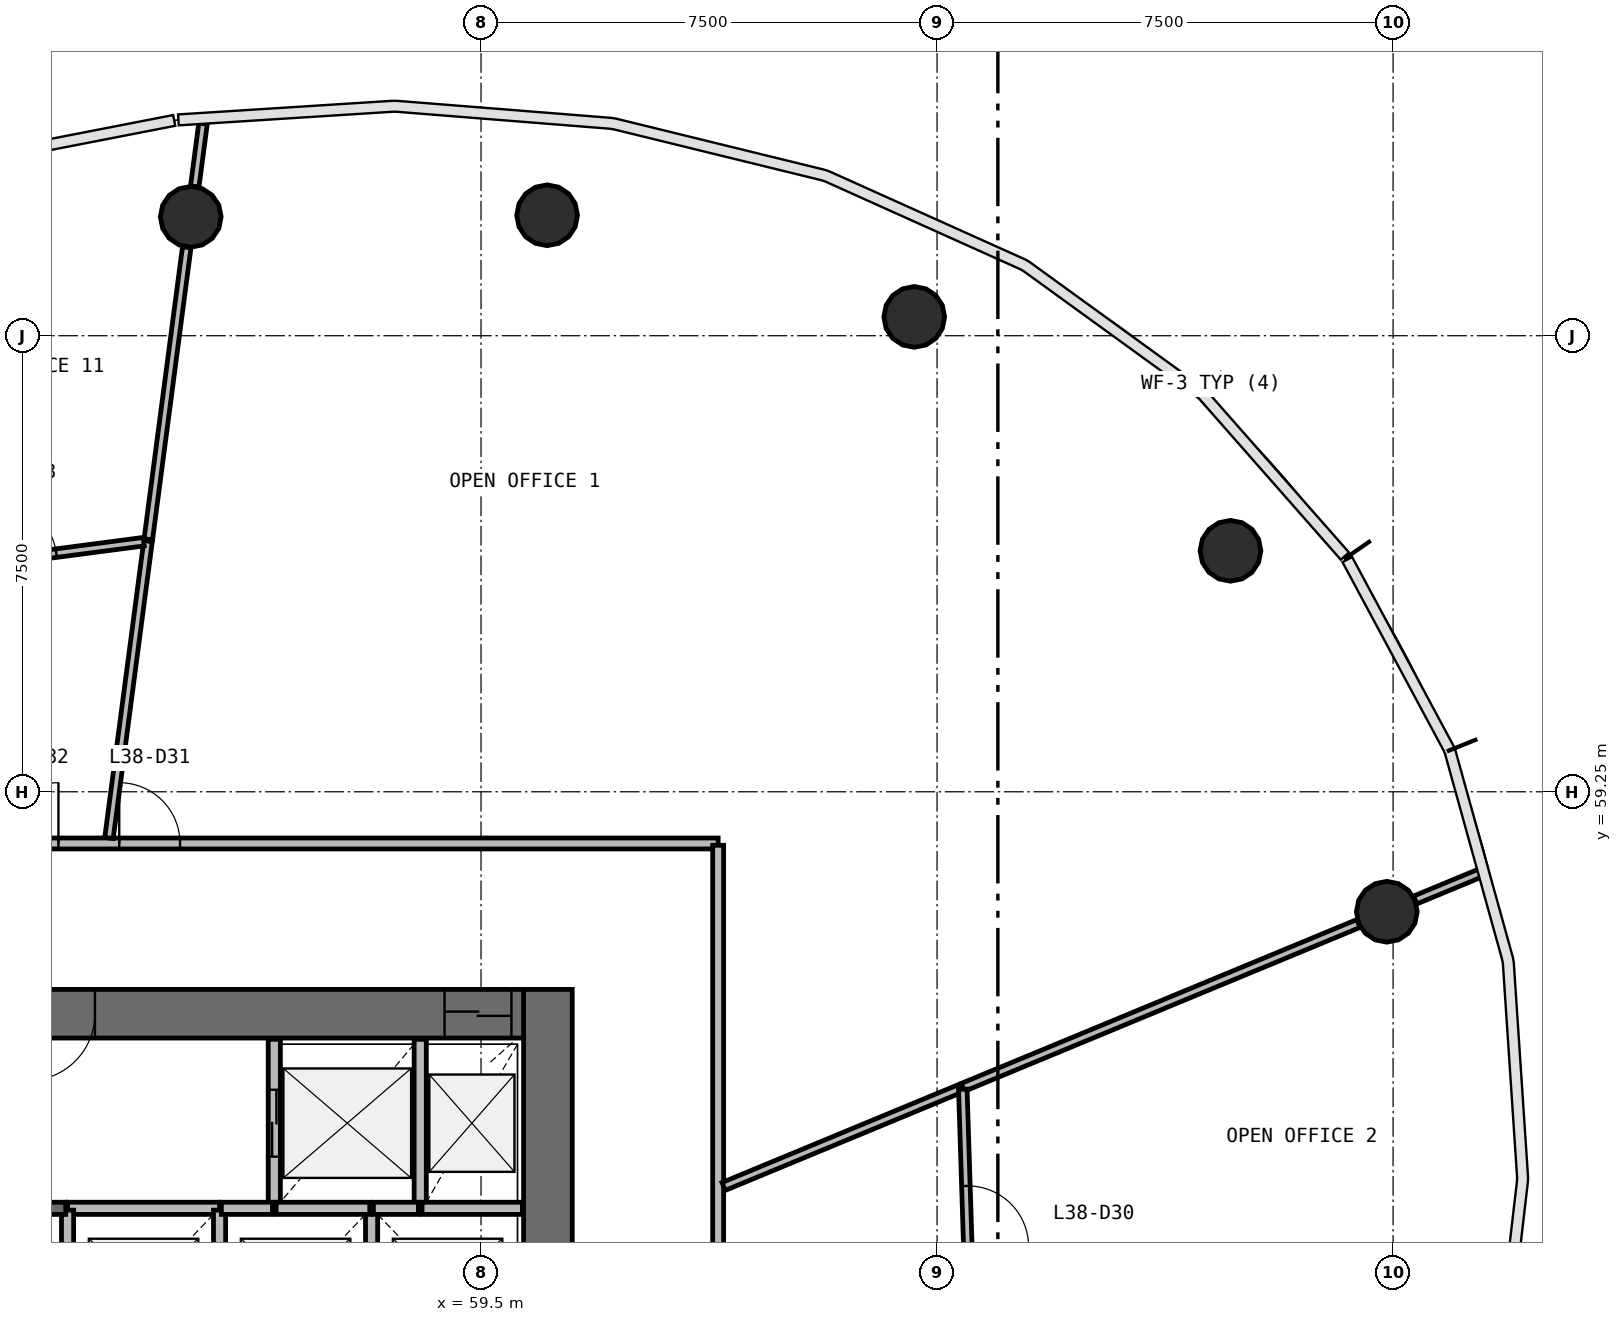
"""IFC4 building model, lengths in metres.
Left out: names, types, materials, properties, quantities, classifications, styles, units other than length and angle.
Written with IfcOpenShell. Run it as: python <this file> out.ifc"""

import sys

from ifc_helpers import new_model, si_unit, direction, frame, frame_2d, origin, origin_2d, place, context, subcontext, project, spatial, rectangle, circle, extrude, source, transform, mapped, element, fill, save


model = new_model("IFC4")
c1 = context("Model", 3, precision=1e-05, world=origin(), true_north=direction((0.0, 1.0)))
c2 = subcontext(c1, "Body", "Model", "MODEL_VIEW")
j1 = project(units=[si_unit("LENGTHUNIT", "METRE"), si_unit("PLANEANGLEUNIT", "RADIAN")], contexts=[c1])
p1 = place(None, origin())
s1 = spatial("IfcSite", under=j1, at=p1, CompositionType="ELEMENT")
p2 = place(p1, origin())
s2 = spatial("IfcBuilding", under=s1, at=p2, CompositionType="ELEMENT")
p3 = place(p2, frame((0.0, 0.0, 160.4)))
s3 = spatial("IfcBuildingStorey", under=s2, at=p3, CompositionType="ELEMENT", Elevation=160.4)
p4 = place(p3, frame((60.6, 40.0, 0.0), z_axis=(0.0, 0.0, 1.0), x_axis=(0.0, 1.0, 0.0)))
e1 = element("IfcWall", 1, at=p4, inside=s3, PredefinedType="SHEAR", context=c2, shape_type="SweptSolid", body=[
    extrude(rectangle(XDim=16.0, YDim=0.8, at=frame_2d((8.0, 0.0))), origin(), (0.0, 0.0, 1.0), 3.9),
])
p5 = place(p4, frame((7.1, 0.0, 0.0)))
e2 = element("IfcOpeningElement", 2, at=p5, cuts=e1, PredefinedType="OPENING", context=c2, shape_type="SweptSolid", body=[
    extrude(rectangle(XDim=1.8, YDim=2.1, at=frame_2d((0.9, 1.05))), frame((0.0, 0.41, 0.0), z_axis=(0.0, -1.0, 0.0), x_axis=(1.0, 0.0, 0.0)), (0.0, 0.0, 1.0), 0.82),
])
p6 = place(p3, frame((60.2, 55.6, 0.0), z_axis=(0.0, 0.0, 1.0), x_axis=(-1.0, 0.0, 0.0)))
e3 = element("IfcWall", 3, at=p6, inside=s3, PredefinedType="SHEAR", context=c2, shape_type="SweptSolid", body=[
    extrude(rectangle(XDim=16.4, YDim=0.8, at=frame_2d((8.2, 0.0))), origin(), (0.0, 0.0, 1.0), 3.9),
])
p7 = place(p6, frame((0.2, 0.0, 0.0)))
e4 = element("IfcOpeningElement", 4, at=p7, cuts=e3, PredefinedType="OPENING", context=c2, shape_type="SweptSolid", body=[
    extrude(rectangle(XDim=1.1, YDim=2.1, at=frame_2d((0.55, 1.05))), frame((0.0, 0.41, 0.0), z_axis=(0.0, -1.0, 0.0), x_axis=(1.0, 0.0, 0.0)), (0.0, 0.0, 1.0), 0.82),
])
p8 = place(p6, frame((10.1, 0.0, 0.0)))
e5 = element("IfcOpeningElement", 5, at=p8, cuts=e3, PredefinedType="OPENING", context=c2, shape_type="SweptSolid", body=[
    extrude(rectangle(XDim=1.2, YDim=2.1, at=frame_2d((0.6, 1.05))), frame((0.0, 0.41, 0.0), z_axis=(0.0, -1.0, 0.0), x_axis=(1.0, 0.0, 0.0)), (0.0, 0.0, 1.0), 0.82),
])
p9 = place(p6, frame((7.05, 0.0, 0.0)))
e6 = element("IfcOpeningElement", 6, at=p9, cuts=e3, PredefinedType="OPENING", context=c2, shape_type="SweptSolid", body=[
    extrude(rectangle(XDim=1.1, YDim=2.1, at=frame_2d((0.55, 1.05))), frame((0.0, 0.41, 0.0), z_axis=(0.0, -1.0, 0.0), x_axis=(1.0, 0.0, 0.0)), (0.0, 0.0, 1.0), 0.82),
])
m1 = source(origin(), c2, "Body", "SweptSolid", [
    extrude(circle(Radius=0.5, at=origin_2d()), origin(), (0.0, 0.0, 1.0), 3.9),
])
for number, where, z_axis, x_axis in (
    (7, (74.397, 57.277, 0.0), (0.0, 0.0, 1.0), (1.0, 0.0, 0.0)),
    (8, (71.826, 63.213, 0.0), (0.0, 0.0, 1.0), (1.0, 0.0, 0.0)),
    (9, (66.625, 67.06, 0.0), (0.0, 0.0, 1.0), (1.0, 0.0, 0.0)),
    (10, (60.587, 68.731, 0.0), (0.0, 0.0, 1.0), (1.0, 0.0, 0.0)),
    (11, (54.726, 68.705, 0.0), (0.0, 0.0, 1.0), (1.0, 0.0, 0.0)),
):
    element("IfcColumn", number, at=place(p3, frame(where, z_axis=z_axis, x_axis=x_axis)), inside=s3, PredefinedType="COLUMN", context=c2, shape_type="MappedRepresentation", body=[
        mapped(m1, transform((0.0, 0.0, 0.0), scale=1.0)),
    ])
p10 = place(p3, frame((56.1, 55.18, 0.0), z_axis=(0.0, 0.0, 1.0), x_axis=(0.0, -1.0, 0.0)))
e12 = element("IfcWall", 12, at=p10, inside=s3, PredefinedType="SOLIDWALL", context=c2, shape_type="SweptSolid", body=[
    extrude(rectangle(XDim=2.78, YDim=0.2, at=frame_2d((1.39, 0.0))), origin(), (0.0, 0.0, 1.0), 3.58),
])
p11 = place(p10, frame((0.83, 0.0, 0.0)))
e13 = element("IfcOpeningElement", 13, at=p11, cuts=e12, PredefinedType="OPENING", context=c2, shape_type="SweptSolid", body=[
    extrude(rectangle(XDim=1.1, YDim=2.1, at=frame_2d((0.55, 1.05))), frame((0.0, 0.11, 0.0), z_axis=(0.0, -1.0, 0.0), x_axis=(1.0, 0.0, 0.0)), (0.0, 0.0, 1.0), 0.22),
])
p12 = place(p3, frame((58.5, 52.4, 0.0), z_axis=(0.0, 0.0, 1.0), x_axis=(0.0, 1.0, 0.0)))
e14 = element("IfcWall", 14, at=p12, inside=s3, PredefinedType="SOLIDWALL", context=c2, shape_type="SweptSolid", body=[
    extrude(rectangle(XDim=2.78, YDim=0.2, at=frame_2d((1.39, 0.0))), origin(), (0.0, 0.0, 1.0), 3.58),
])
p13 = place(p3, frame((55.2, 52.4, 0.0), z_axis=(0.0, 0.0, 1.0), x_axis=(-1.0, 0.0, 0.0)))
e15 = element("IfcWall", 15, at=p13, inside=s3, PredefinedType="SOLIDWALL", context=c2, shape_type="SweptSolid", body=[
    extrude(rectangle(XDim=2.5, YDim=0.2, at=frame_2d((1.25, 0.0))), origin(), (0.0, 0.0, 1.0), 3.58),
])
for number, where, z_axis, x_axis in (
    (16, (52.7, 52.37, 0.0), (0.0, 0.0, 1.0), (0.0, -1.0, 0.0)),
    (17, (55.2, 50.01, 0.0), (0.0, 0.0, 1.0), (0.0, 1.0, 0.0)),
):
    element("IfcWall", number, at=place(p3, frame(where, z_axis=z_axis, x_axis=x_axis)), inside=s3, PredefinedType="SOLIDWALL", context=c2, shape_type="SweptSolid", body=[
        extrude(rectangle(XDim=2.36, YDim=0.2, at=frame_2d((1.18, 0.0))), origin(), (0.0, 0.0, 1.0), 3.58),
    ])
p14 = place(p3, frame((57.7, 50.01, 0.0), z_axis=(0.0, 0.0, 1.0), x_axis=(0.0, 1.0, 0.0)))
e18 = element("IfcWall", 18, at=p14, inside=s3, PredefinedType="SOLIDWALL", context=c2, shape_type="SweptSolid", body=[
    extrude(rectangle(XDim=2.39, YDim=0.2, at=frame_2d((1.195, 0.0))), origin(), (0.0, 0.0, 1.0), 3.58),
])
p15 = place(p3, frame((50.43, 52.4, 0.0), z_axis=(0.0, 0.0, 1.0), x_axis=(1.0, 0.0, 0.0)))
e19 = element("IfcWall", 19, at=p15, inside=s3, PredefinedType="SOLIDWALL", context=c2, shape_type="SweptSolid", body=[
    extrude(rectangle(XDim=2.24, YDim=0.2, at=frame_2d((1.12, 0.0))), origin(), (0.0, 0.0, 1.0), 3.58),
])
p16 = place(p3, frame((60.18, 52.4, 0.0), z_axis=(0.0, 0.0, 1.0), x_axis=(-1.0, 0.0, 0.0)))
e20 = element("IfcWall", 20, at=p16, inside=s3, PredefinedType="SOLIDWALL", context=c2, shape_type="SweptSolid", body=[
    extrude(rectangle(XDim=1.65, YDim=0.2, at=frame_2d((0.825, 0.0))), origin(), (0.0, 0.0, 1.0), 3.58),
])
p17 = place(p3, frame((57.67, 52.4, 0.0), z_axis=(0.0, 0.0, 1.0), x_axis=(-1.0, 0.0, 0.0)))
e21 = element("IfcWall", 21, at=p17, inside=s3, PredefinedType="SOLIDWALL", context=c2, shape_type="SweptSolid", body=[
    extrude(rectangle(XDim=1.54, YDim=0.2, at=frame_2d((0.77, 0.0))), origin(), (0.0, 0.0, 1.0), 3.58),
])
p18 = place(p3, frame((56.07, 52.4, 0.0), z_axis=(0.0, 0.0, 1.0), x_axis=(-1.0, 0.0, 0.0)))
e22 = element("IfcWall", 22, at=p18, inside=s3, PredefinedType="SOLIDWALL", context=c2, shape_type="SweptSolid", body=[
    extrude(rectangle(XDim=0.84, YDim=0.2, at=frame_2d((0.42, 0.0))), origin(), (0.0, 0.0, 1.0), 3.58),
])
p19 = place(p3, frame((58.47, 52.4, 0.0), z_axis=(0.0, 0.0, 1.0), x_axis=(-1.0, 0.0, 0.0)))
e23 = element("IfcWall", 23, at=p19, inside=s3, PredefinedType="SOLIDWALL", context=c2, shape_type="SweptSolid", body=[
    extrude(rectangle(XDim=0.74, YDim=0.2, at=frame_2d((0.37, 0.0))), origin(), (0.0, 0.0, 1.0), 3.58),
])
p20 = place(p3, frame((40.6, 58.4, 0.0), z_axis=(0.0, 0.0, 1.0), x_axis=(1.0, 0.0, 0.0)))
e24 = element("IfcWall", 24, at=p20, inside=s3, PredefinedType="PARTITIONING", context=c2, shape_type="SweptSolid", body=[
    extrude(rectangle(XDim=22.8, YDim=0.18, at=frame_2d((11.4, 0.0))), origin(), (0.0, 0.0, 1.0), 2.88),
])
p21 = place(p20, frame((12.95, 0.0, 0.0)))
e25 = element("IfcOpeningElement", 25, at=p21, cuts=e24, PredefinedType="OPENING", context=c2, shape_type="SweptSolid", body=[
    extrude(rectangle(XDim=1.0, YDim=2.1, at=frame_2d((0.5, 1.05))), frame((0.0, 0.1, 0.0), z_axis=(0.0, -1.0, 0.0), x_axis=(1.0, 0.0, 0.0)), (0.0, 0.0, 1.0), 0.2),
])
p22 = place(p20, frame((10.95, 0.0, 0.0)))
e26 = element("IfcOpeningElement", 26, at=p22, cuts=e24, PredefinedType="OPENING", context=c2, shape_type="SweptSolid", body=[
    extrude(rectangle(XDim=1.0, YDim=2.1, at=frame_2d((0.5, 1.05))), frame((0.0, 0.1, 0.0), z_axis=(0.0, -1.0, 0.0), x_axis=(1.0, 0.0, 0.0)), (0.0, 0.0, 1.0), 0.2),
])
p23 = place(p3, frame((63.4, 58.37, 0.0), z_axis=(0.0, 0.0, 1.0), x_axis=(0.0, -1.0, 0.0)))
e27 = element("IfcWall", 27, at=p23, inside=s3, PredefinedType="PARTITIONING", context=c2, shape_type="SweptSolid", body=[
    extrude(rectangle(XDim=20.74, YDim=0.18, at=frame_2d((10.37, 0.0))), origin(), (0.0, 0.0, 1.0), 2.88),
])
p24 = place(p23, frame((15.49, 0.0, 0.0)))
e28 = element("IfcOpeningElement", 28, at=p24, cuts=e27, PredefinedType="OPENING", context=c2, shape_type="SweptSolid", body=[
    extrude(rectangle(XDim=1.0, YDim=2.1, at=frame_2d((0.5, 1.05))), frame((0.0, 0.1, 0.0), z_axis=(0.0, -1.0, 0.0), x_axis=(1.0, 0.0, 0.0)), (0.0, 0.0, 1.0), 0.2),
])
p25 = place(p23, frame((9.89, 0.0, 0.0)))
e29 = element("IfcOpeningElement", 29, at=p25, cuts=e27, PredefinedType="OPENING", context=c2, shape_type="SweptSolid", body=[
    extrude(rectangle(XDim=1.0, YDim=2.1, at=frame_2d((0.5, 1.05))), frame((0.0, 0.1, 0.0), z_axis=(0.0, -1.0, 0.0), x_axis=(1.0, 0.0, 0.0)), (0.0, 0.0, 1.0), 0.2),
])
p26 = place(p3, frame((67.423, 54.388, 0.0), z_axis=(0.0, 0.0, 1.0), x_axis=(0.923877847589, 0.382687500102, 0.0)))
e30 = element("IfcWall", 30, at=p26, inside=s3, PredefinedType="PARTITIONING", context=c2, shape_type="SweptSolid", body=[
    extrude(rectangle(XDim=7.044, YDim=0.14, at=frame_2d((3.522, 0.0))), origin(), (0.0, 0.0, 1.0), 2.88),
])
p27 = place(p3, frame((53.381, 58.49, 0.0), z_axis=(0.0, 0.0, 1.0), x_axis=(0.130523758186, 0.991445181817, 0.0)))
e31 = element("IfcWall", 31, at=p27, inside=s3, PredefinedType="PARTITIONING", context=c2, shape_type="SweptSolid", body=[
    extrude(rectangle(XDim=4.925, YDim=0.14, at=frame_2d((2.462, 0.0))), origin(), (0.0, 0.0, 1.0), 2.88),
])
p28 = place(p3, frame((54.028, 63.402, 0.0), z_axis=(0.0, 0.0, 1.0), x_axis=(0.130532734851, 0.991443999998, 0.0)))
e32 = element("IfcWall", 32, at=p28, inside=s3, PredefinedType="PARTITIONING", context=c2, shape_type="SweptSolid", body=[
    extrude(rectangle(XDim=4.844, YDim=0.14, at=frame_2d((2.422, 0.0))), origin(), (0.0, 0.0, 1.0), 2.88),
])
p29 = place(p3, frame((63.49, 52.759, 0.0), z_axis=(0.0, 0.0, 1.0), x_axis=(0.923878137975, 0.382686799055, 0.0)))
e33 = element("IfcWall", 33, at=p29, inside=s3, PredefinedType="PARTITIONING", context=c2, shape_type="SweptSolid", body=[
    extrude(rectangle(XDim=4.227, YDim=0.14, at=frame_2d((2.113, 0.0))), origin(), (0.0, 0.0, 1.0), 2.88),
])
p30 = place(p3, frame((67.424, 54.358, 0.0), z_axis=(0.0, 0.0, 1.0), x_axis=(0.031887030208, -0.999491479356, 0.0)))
e34 = element("IfcWall", 34, at=p30, inside=s3, PredefinedType="PARTITIONING", context=c2, shape_type="SweptSolid", body=[
    extrude(rectangle(XDim=4.242, YDim=0.14, at=frame_2d((2.121, 0.0))), origin(), (0.0, 0.0, 1.0), 2.88),
])
p31 = place(p30, frame((1.592, 0.0, 0.0)))
e35 = element("IfcOpeningElement", 35, at=p31, cuts=e34, PredefinedType="OPENING", context=c2, shape_type="SweptSolid", body=[
    extrude(rectangle(XDim=1.0, YDim=2.1, at=frame_2d((0.5, 1.05))), frame((0.0, 0.08, 0.0), z_axis=(0.0, -1.0, 0.0), x_axis=(1.0, 0.0, 0.0)), (0.0, 0.0, 1.0), 0.16),
])
p32 = place(p3, frame((50.075, 62.854, 0.0), z_axis=(0.0, 0.0, 1.0), x_axis=(0.991491442794, 0.130171882012, 0.0)))
e36 = element("IfcWall", 36, at=p32, inside=s3, PredefinedType="PARTITIONING", context=c2, shape_type="SweptSolid", body=[
    extrude(rectangle(XDim=3.91, YDim=0.14, at=frame_2d((1.955, 0.0))), origin(), (0.0, 0.0, 1.0), 2.88),
])
p33 = place(p32, frame((1.461, 0.0, 0.0)))
e37 = element("IfcOpeningElement", 37, at=p33, cuts=e36, PredefinedType="OPENING", context=c2, shape_type="SweptSolid", body=[
    extrude(rectangle(XDim=1.0, YDim=2.1, at=frame_2d((0.5, 1.05))), frame((0.0, 0.08, 0.0), z_axis=(0.0, -1.0, 0.0), x_axis=(1.0, 0.0, 0.0)), (0.0, 0.0, 1.0), 0.16),
])
p34 = place(p3, frame((74.863, 57.47, 0.0), z_axis=(0.0, 0.0, 1.0), x_axis=(0.923882723383, 0.382675728829, 0.0)))
e38 = element("IfcWall", 38, at=p34, inside=s3, PredefinedType="PARTITIONING", context=c2, shape_type="SweptSolid", body=[
    extrude(rectangle(XDim=1.198, YDim=0.14, at=frame_2d((0.599, 0.0))), origin(), (0.0, 0.0, 1.0), 2.88),
])
p35 = place(p3, frame((54.792, 69.205, 0.0), z_axis=(0.0, 0.0, 1.0), x_axis=(0.130569518357, 0.991439156417, 0.0)))
e39 = element("IfcWall", 39, at=p35, inside=s3, PredefinedType="PARTITIONING", context=c2, shape_type="SweptSolid", body=[
    extrude(rectangle(XDim=1.043, YDim=0.14, at=frame_2d((0.522, 0.0))), origin(), (0.0, 0.0, 1.0), 2.88),
])
m2 = source(origin(), c2, "Body", "SweptSolid", [
    extrude(rectangle(XDim=1.1, YDim=2.1, at=frame_2d((0.55, 1.05))), frame((0.0, 0.025, 0.0), z_axis=(0.0, -1.0, 0.0), x_axis=(1.0, 0.0, 0.0)), (0.0, 0.0, 1.0), 0.05),
])
p36 = place(p11, origin())
e40 = element("IfcDoor", 40, at=p36, inside=s3, OperationType="DOUBLE_DOOR_SLIDING", PredefinedType="USERDEFINED", context=c2, shape_type="MappedRepresentation", body=[
    mapped(m2, transform((0.0, 0.0, 0.0), scale=1.0)),
])
fill(e13, e40)
p37 = place(p7, origin())
e41 = element("IfcDoor", 41, at=p37, inside=s3, OperationType="DOUBLE_DOOR_SLIDING", PredefinedType="USERDEFINED", context=c2, shape_type="MappedRepresentation", body=[
    mapped(m2, transform((0.0, 0.0, 0.0), scale=1.0)),
])
fill(e4, e41)
m3 = source(origin(), c2, "Body", "SweptSolid", [
    extrude(rectangle(XDim=1.1, YDim=2.1, at=frame_2d((0.55, 1.05))), frame((0.0, 0.025, 0.0), z_axis=(0.0, -1.0, 0.0), x_axis=(1.0, 0.0, 0.0)), (0.0, 0.0, 1.0), 0.05),
])
p38 = place(p9, origin())
e42 = element("IfcDoor", 42, at=p38, inside=s3, OperationType="SINGLE_SWING_RIGHT", PredefinedType="DOOR", context=c2, shape_type="MappedRepresentation", body=[
    mapped(m3, transform((0.0, 0.0, 0.0), scale=1.0)),
])
fill(e6, e42)
m4 = source(origin(), c2, "Body", "SweptSolid", [
    extrude(rectangle(XDim=1.0, YDim=2.1, at=frame_2d((0.5, 1.05))), frame((0.0, 0.025, 0.0), z_axis=(0.0, -1.0, 0.0), x_axis=(1.0, 0.0, 0.0)), (0.0, 0.0, 1.0), 0.05),
])
p39 = place(p31, origin())
e43 = element("IfcDoor", 43, at=p39, inside=s3, OperationType="SINGLE_SWING_RIGHT", PredefinedType="DOOR", context=c2, shape_type="MappedRepresentation", body=[
    mapped(m4, transform((0.0, 0.0, 0.0), scale=1.0)),
])
fill(e35, e43)
p40 = place(p21, origin())
e44 = element("IfcDoor", 44, at=p40, inside=s3, OperationType="SINGLE_SWING_LEFT", PredefinedType="DOOR", context=c2, shape_type="MappedRepresentation", body=[
    mapped(m4, transform((0.0, 0.0, 0.0), scale=1.0)),
])
fill(e25, e44)
p41 = place(p22, origin())
e45 = element("IfcDoor", 45, at=p41, inside=s3, OperationType="SINGLE_SWING_RIGHT", PredefinedType="DOOR", context=c2, shape_type="MappedRepresentation", body=[
    mapped(m4, transform((0.0, 0.0, 0.0), scale=1.0)),
])
fill(e26, e45)
p42 = place(p33, origin())
e46 = element("IfcDoor", 46, at=p42, inside=s3, OperationType="SINGLE_SWING_LEFT", PredefinedType="DOOR", context=c2, shape_type="MappedRepresentation", body=[
    mapped(m4, transform((0.0, 0.0, 0.0), scale=1.0)),
])
fill(e37, e46)
save(model, sys.argv[1])
